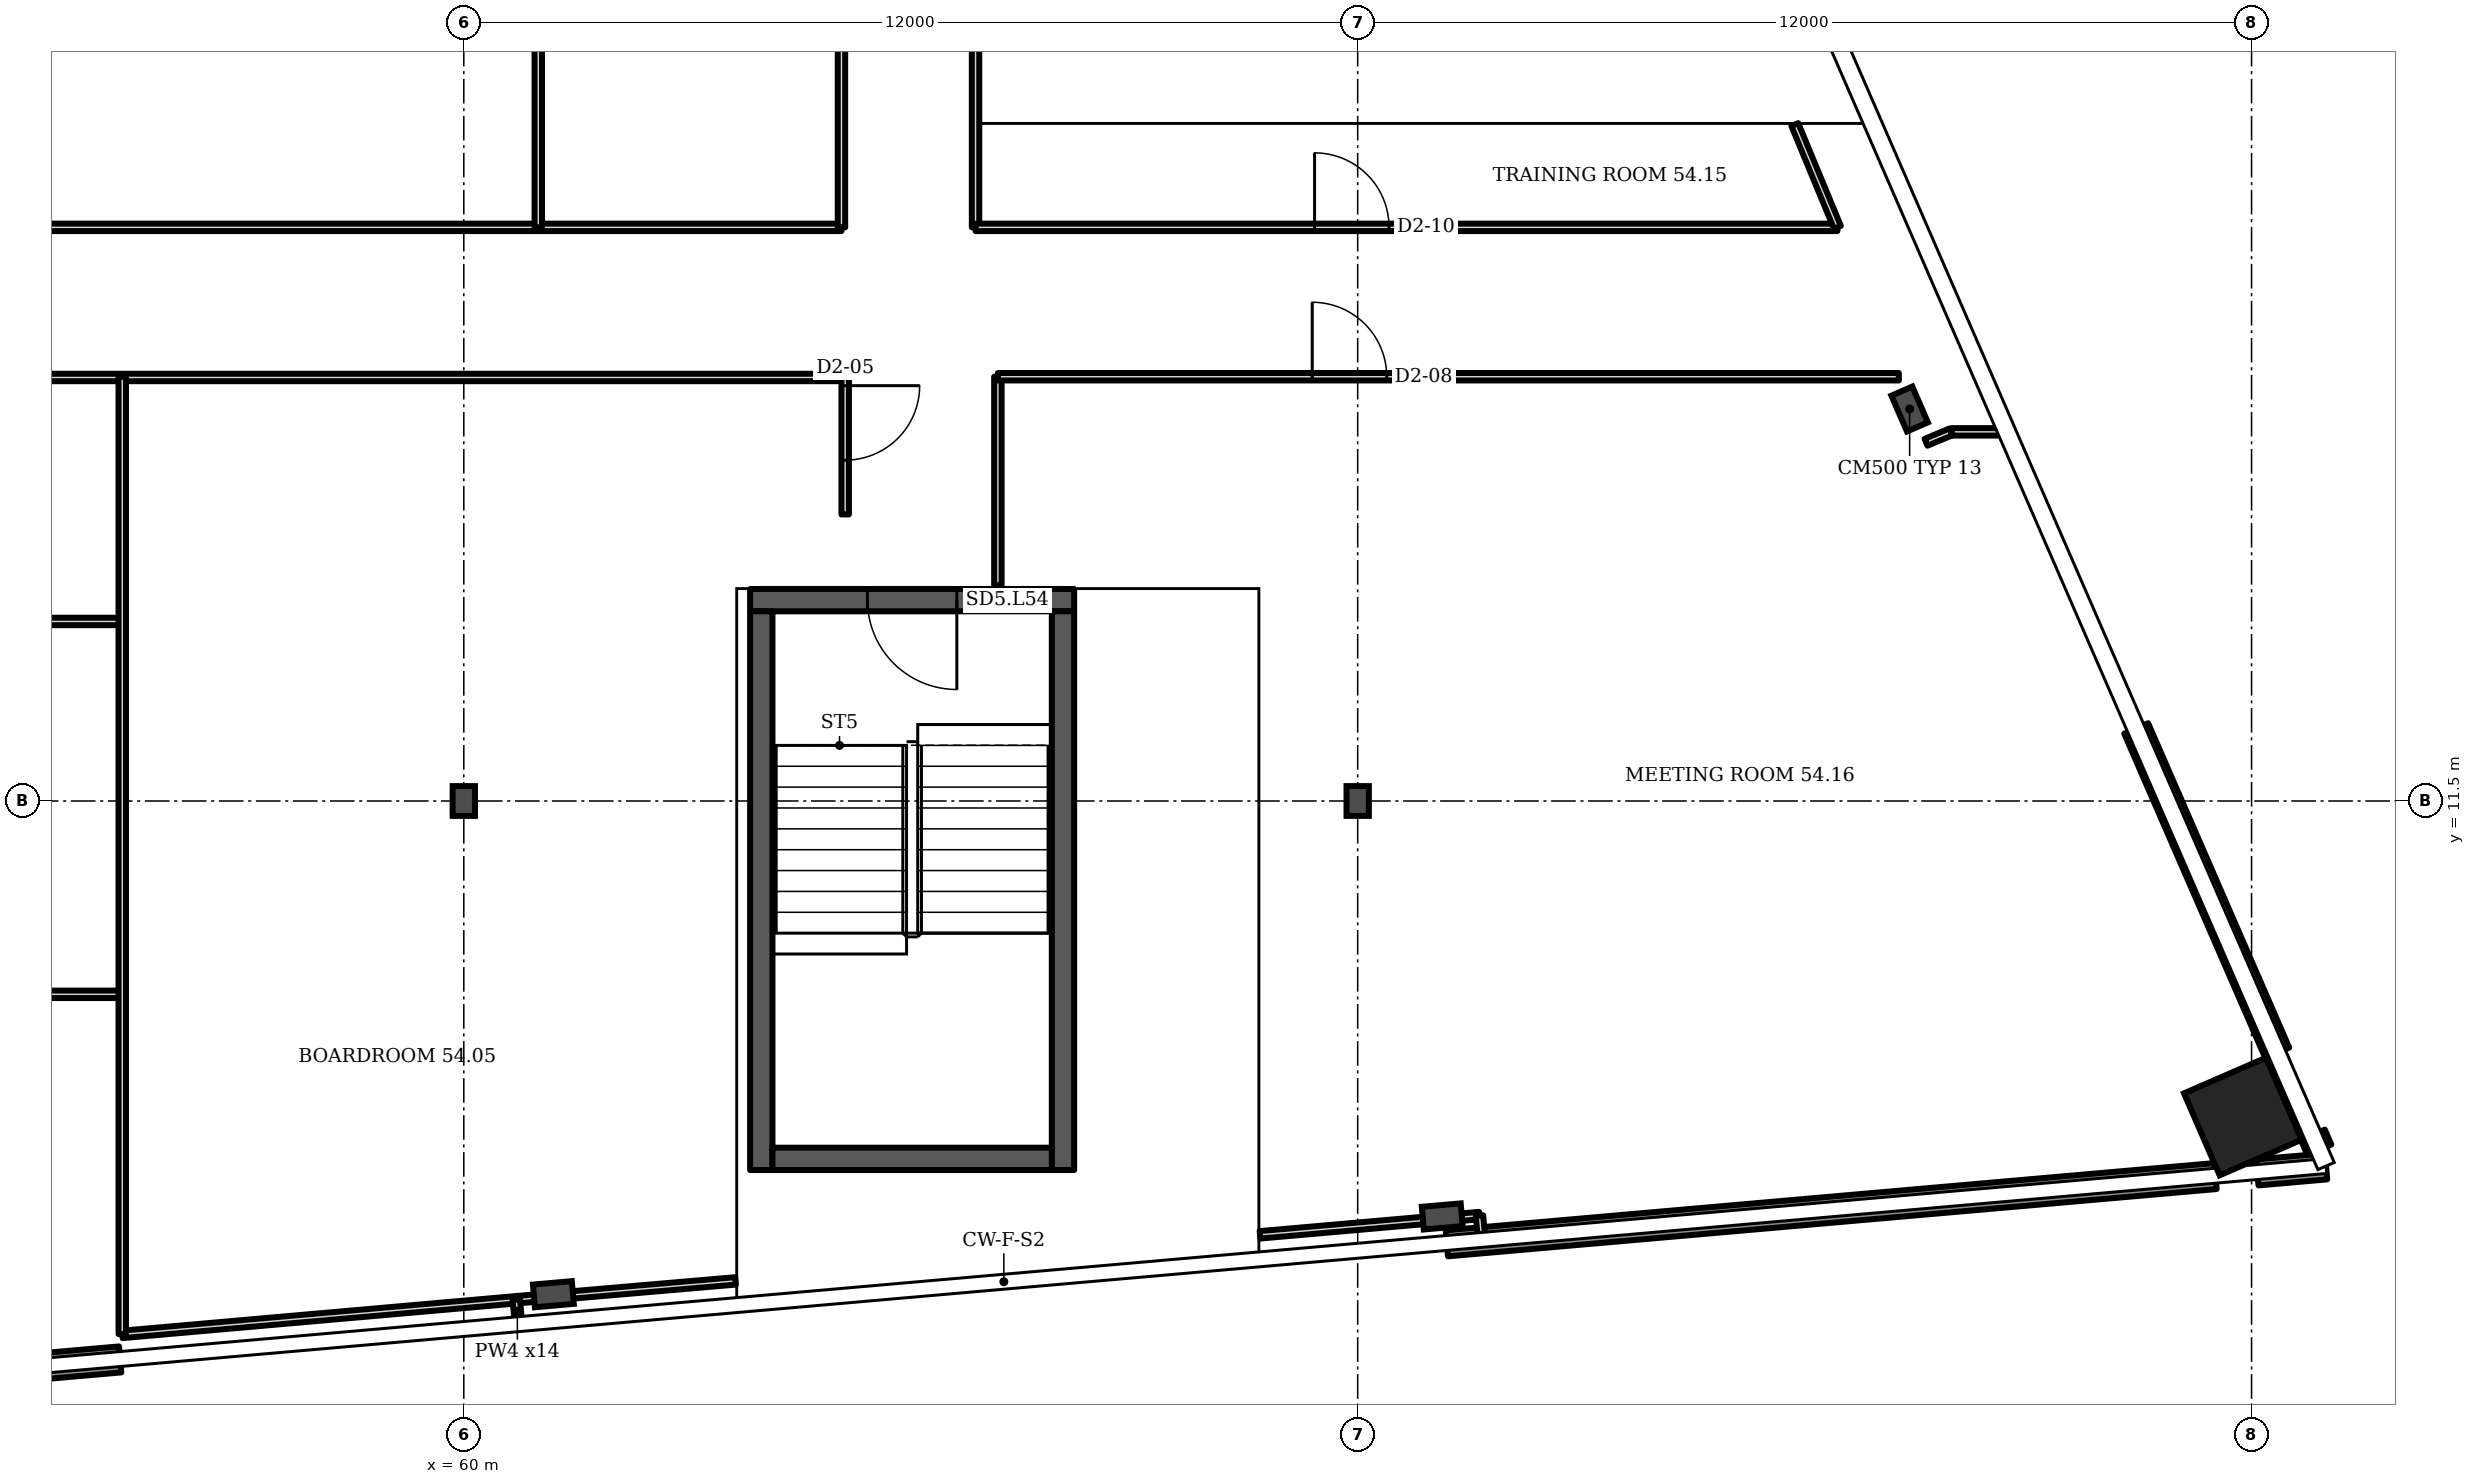
"""IFC4 building model, lengths in metres.
Left out: names, types, materials, properties, quantities, classifications, styles, units other than length and angle.
Written with IfcOpenShell. Run it as: python <this file> out.ifc"""

import sys

from ifc_helpers import new_model, si_unit, direction, frame, frame_2d, origin, origin_2d, place, context, subcontext, project, spatial, rectangle, i_section, extrude, element, fill, save


model = new_model("IFC4")
c1 = context("Model", 3, precision=1e-05, world=origin(), true_north=direction((0.0, 1.0)))
c2 = subcontext(c1, "Body", "Model", "MODEL_VIEW")
j1 = project(units=[si_unit("LENGTHUNIT", "METRE"), si_unit("PLANEANGLEUNIT", "RADIAN")], contexts=[c1])
p1 = place(None, origin())
s1 = spatial("IfcSite", under=j1, at=p1, CompositionType="ELEMENT")
p2 = place(p1, origin())
s2 = spatial("IfcBuilding", under=s1, at=p2, CompositionType="ELEMENT")
p3 = place(p2, frame((0.0, 0.0, 217.9)))
s3 = spatial("IfcBuildingStorey", under=s2, at=p3, CompositionType="ELEMENT", Elevation=217.9)
p4 = place(p3, frame((83.883, 7.265, 0.0), z_axis=(0.0, 0.0, 1.0), x_axis=(-0.398727, 0.917072, 0.0)))
e1 = element("IfcColumn", 1, at=p4, inside=s3, PredefinedType="COLUMN", context=c2, shape_type="SweptSolid", body=[
    extrude(rectangle(XDim=1.2, YDim=1.2, at=origin_2d()), origin(), (0.0, 0.0, 1.0), 3.6),
])
for number, where, z_axis, x_axis in (
    (2, (61.202, 4.879, 0.0), (0.0, 0.0, 1.0), (0.087, -0.996, 0.0)),
    (3, (73.135, 5.923, 0.0), (0.0, 0.0, 1.0), (0.087, -0.996, 0.0)),
    (4, (79.41, 16.762, 0.0), (0.0, 0.0, 1.0), (0.917, 0.399, 0.0)),
):
    element("IfcColumn", number, at=place(p3, frame(where, z_axis=z_axis, x_axis=x_axis)), inside=s3, PredefinedType="COLUMN", context=c2, shape_type="SweptSolid", body=[
        extrude(i_section(OverallWidth=0.306, OverallDepth=0.524, WebThickness=0.021, FlangeThickness=0.04, FilletRadius=0.027, at=origin_2d()), origin(), (0.0, 0.0, 1.0), 3.6),
    ])
for number, where, z_axis, x_axis in (
    (5, (60.0, 11.5, 0.0), (0.0, 0.0, 1.0), (1.0, 0.0, 0.0)),
    (6, (72.0, 11.5, 0.0), (0.0, 0.0, 1.0), (1.0, 0.0, 0.0)),
):
    element("IfcColumn", number, at=place(p3, frame(where, z_axis=z_axis, x_axis=x_axis)), inside=s3, PredefinedType="COLUMN", context=c2, shape_type="SweptSolid", body=[
        extrude(i_section(OverallWidth=0.3, OverallDepth=0.4, WebThickness=0.013, FlangeThickness=0.024, FilletRadius=0.027, at=origin_2d()), origin(), (0.0, 0.0, 1.0), 3.6),
    ])
p5 = place(p3, frame((49.545, 3.493, 0.0), z_axis=(0.0, 0.0, 1.0), x_axis=(0.996196, 0.087138, 0.0)))
e7 = element("IfcWall", 7, at=p5, inside=s3, PredefinedType="SOLIDWALL", context=c2, shape_type="SweptSolid", body=[
    extrude(rectangle(XDim=5.864, YDim=0.35, at=frame_2d((2.932, 0.0))), origin(), (0.0, 0.0, 1.0), 1.0),
])
p6 = place(p3, frame((73.197, 5.562, 0.0), z_axis=(0.0, 0.0, 1.0), x_axis=(0.996198, 0.087163, 0.0)))
e8 = element("IfcWall", 8, at=p6, inside=s3, PredefinedType="SOLIDWALL", context=c2, shape_type="SweptSolid", body=[
    extrude(rectangle(XDim=10.358, YDim=0.35, at=frame_2d((5.179, 0.0))), origin(), (0.0, 0.0, 1.0), 1.0),
])
p7 = place(p3, frame((84.078, 6.514, 0.0), z_axis=(0.0, 0.0, 1.0), x_axis=(0.996213, 0.086971, 0.0)))
e9 = element("IfcWall", 9, at=p7, inside=s3, PredefinedType="SOLIDWALL", context=c2, shape_type="SweptSolid", body=[
    extrude(rectangle(XDim=0.926, YDim=0.35, at=frame_2d((0.463, 0.0))), origin(), (0.0, 0.0, 1.0), 1.0),
])
p8 = place(p3, frame((84.91, 6.819, 0.0), z_axis=(0.0, 0.0, 1.0), x_axis=(-0.398359, 0.91723, 0.0)))
e10 = element("IfcWall", 10, at=p8, inside=s3, PredefinedType="SOLIDWALL", context=c2, shape_type="SweptSolid", body=[
    extrude(rectangle(XDim=0.219, YDim=0.35, at=frame_2d((0.109, 0.0))), origin(), (0.0, 0.0, 1.0), 1.0),
])
p9 = place(p3, frame((84.345, 8.12, 0.0), z_axis=(0.0, 0.0, 1.0), x_axis=(-0.398736, 0.917067, 0.0)))
e11 = element("IfcWall", 11, at=p9, inside=s3, PredefinedType="SOLIDWALL", context=c2, shape_type="SweptSolid", body=[
    extrude(rectangle(XDim=4.748, YDim=0.35, at=frame_2d((2.374, 0.0))), origin(), (0.0, 0.0, 1.0), 1.0),
])
p10 = place(p3, frame((63.844, 14.196, 0.0), z_axis=(0.0, 0.0, 1.0), x_axis=(1.0, 0.0, 0.0)))
e12 = element("IfcWall", 12, at=p10, inside=s3, PredefinedType="SHEAR", context=c2, shape_type="SweptSolid", body=[
    extrude(rectangle(XDim=4.35, YDim=0.3, at=frame_2d((2.175, 0.0))), origin(), (0.0, 0.0, 1.0), 3.2),
])
p11 = place(p10, frame((1.575, 0.0, 0.0)))
e13 = element("IfcOpeningElement", 13, at=p11, cuts=e12, PredefinedType="OPENING", context=c2, shape_type="SweptSolid", body=[
    extrude(rectangle(XDim=1.2, YDim=2.1, at=frame_2d((0.6, 1.05))), frame((0.0, 0.16, 0.0), z_axis=(0.0, -1.0, 0.0), x_axis=(1.0, 0.0, 0.0)), (0.0, 0.0, 1.0), 0.32),
])
p12 = place(p3, frame((47.36, 19.2, 0.0), z_axis=(0.0, 0.0, 1.0), x_axis=(1.0, 0.0, 0.0)))
e14 = element("IfcWall", 14, at=p12, inside=s3, PredefinedType="PARTITIONING", context=c2, shape_type="SweptSolid", body=[
    extrude(rectangle(XDim=17.71, YDim=0.1, at=frame_2d((8.855, 0.0))), origin(), (0.0, 0.0, 1.0), 3.2),
])
p13 = place(p3, frame((47.37, 17.185, 0.0), z_axis=(0.0, 0.0, 1.0), x_axis=(1.0, 0.0, 0.0)))
e15 = element("IfcWall", 15, at=p13, inside=s3, PredefinedType="PARTITIONING", context=c2, shape_type="SweptSolid", body=[
    extrude(rectangle(XDim=17.75, YDim=0.1, at=frame_2d((8.875, 0.0))), origin(), (0.0, 0.0, 1.0), 3.2),
])
for number, where, z_axis, x_axis in (
    (16, (49.16, 8.905, 0.0), (0.0, 0.0, 1.0), (1.0, 0.0, 0.0)),
    (17, (49.16, 13.91, 0.0), (0.0, 0.0, 1.0), (1.0, 0.0, 0.0)),
):
    element("IfcWall", number, at=place(p3, frame(where, z_axis=z_axis, x_axis=x_axis)), inside=s3, PredefinedType="PARTITIONING", context=c2, shape_type="SweptSolid", body=[
        extrude(rectangle(XDim=6.255, YDim=0.1, at=frame_2d((3.127, 0.0))), origin(), (0.0, 0.0, 1.0), 3.2),
    ])
p14 = place(p3, frame((55.415, 4.34, 0.0), z_axis=(0.0, 0.0, 1.0), x_axis=(0.996159, 0.087534, 0.0)))
e18 = element("IfcWall", 18, at=p14, inside=s3, PredefinedType="PARTITIONING", context=c2, shape_type="SweptSolid", body=[
    extrude(rectangle(XDim=5.31, YDim=0.1, at=frame_2d((2.655, 0.0))), origin(), (0.0, 0.0, 1.0), 2.58),
])
p15 = place(p3, frame((55.415, 4.345, 0.0), z_axis=(0.0, 0.0, 1.0), x_axis=(0.0, 1.0, 0.0)))
e19 = element("IfcWall", 19, at=p15, inside=s3, PredefinedType="PARTITIONING", context=c2, shape_type="SweptSolid", body=[
    extrude(rectangle(XDim=12.85, YDim=0.1, at=frame_2d((6.425, 0.0))), origin(), (0.0, 0.0, 1.0), 3.2),
])
p16 = place(p3, frame((60.705, 4.805, 0.0), z_axis=(0.0, 0.0, 1.0), x_axis=(0.996324, 0.085692, 0.0)))
e20 = element("IfcWall", 20, at=p16, inside=s3, PredefinedType="PARTITIONING", context=c2, shape_type="SweptSolid", body=[
    extrude(rectangle(XDim=2.955, YDim=0.1, at=frame_2d((1.477, 0.0))), origin(), (0.0, 0.0, 1.0), 2.58),
])
p17 = place(p3, frame((60.733, 4.497, 0.0), z_axis=(0.0, 0.0, 1.0), x_axis=(-0.090037, 0.995936, 0.0)))
e21 = element("IfcWall", 21, at=p17, inside=s3, PredefinedType="PARTITIONING", context=c2, shape_type="SweptSolid", body=[
    extrude(rectangle(XDim=0.309, YDim=0.1, at=frame_2d((0.155, 0.0))), origin(), (0.0, 0.0, 1.0), 3.2),
])
p18 = place(p3, frame((61.0, 19.2, 0.0), z_axis=(0.0, 0.0, 1.0), x_axis=(0.0, 1.0, 0.0)))
e22 = element("IfcWall", 22, at=p18, inside=s3, PredefinedType="PARTITIONING", context=c2, shape_type="SweptSolid", body=[
    extrude(rectangle(XDim=22.78, YDim=0.1, at=frame_2d((11.39, 0.0))), origin(), (0.0, 0.0, 1.0), 3.2),
])
p19 = place(p3, frame((65.07, 19.2, 0.0), z_axis=(0.0, 0.0, 1.0), x_axis=(0.0, 1.0, 0.0)))
e23 = element("IfcWall", 23, at=p19, inside=s3, PredefinedType="PARTITIONING", context=c2, shape_type="SweptSolid", body=[
    extrude(rectangle(XDim=5.65, YDim=0.1, at=frame_2d((2.825, 0.0))), origin(), (0.0, 0.0, 1.0), 3.2),
])
p20 = place(p19, frame((2.619, 0.0, 0.0)))
e24 = element("IfcOpeningElement", 24, at=p20, cuts=e23, PredefinedType="OPENING", context=c2, shape_type="SweptSolid", body=[
    extrude(rectangle(XDim=1.0, YDim=2.1, at=frame_2d((0.5, 1.05))), frame((0.0, 0.06, 0.0), z_axis=(0.0, -1.0, 0.0), x_axis=(1.0, 0.0, 0.0)), (0.0, 0.0, 1.0), 0.12),
])
p21 = place(p3, frame((65.12, 15.346, 0.0), z_axis=(0.0, 0.0, 1.0), x_axis=(0.0, 1.0, 0.0)))
e25 = element("IfcWall", 25, at=p21, inside=s3, PredefinedType="PARTITIONING", context=c2, shape_type="SweptSolid", body=[
    extrude(rectangle(XDim=1.849, YDim=0.1, at=frame_2d((0.924, 0.0))), origin(), (0.0, 0.0, 1.0), 3.2),
])
p22 = place(p21, frame((0.729, 0.0, 0.0)))
e26 = element("IfcOpeningElement", 26, at=p22, cuts=e25, PredefinedType="OPENING", context=c2, shape_type="SweptSolid", body=[
    extrude(rectangle(XDim=1.0, YDim=2.1, at=frame_2d((0.5, 1.05))), frame((0.0, 0.06, 0.0), z_axis=(0.0, -1.0, 0.0), x_axis=(1.0, 0.0, 0.0)), (0.0, 0.0, 1.0), 0.12),
])
p23 = place(p3, frame((66.87, 19.2, 0.0), z_axis=(0.0, 0.0, 1.0), x_axis=(0.0, 1.0, 0.0)))
e27 = element("IfcWall", 27, at=p23, inside=s3, PredefinedType="PARTITIONING", context=c2, shape_type="SweptSolid", body=[
    extrude(rectangle(XDim=2.575, YDim=0.1, at=frame_2d((1.288, 0.0))), origin(), (0.0, 0.0, 1.0), 3.2),
])
p24 = place(p3, frame((66.87, 19.2, 0.0), z_axis=(0.0, 0.0, 1.0), x_axis=(1.0, 0.0, 0.0)))
e28 = element("IfcWall", 28, at=p24, inside=s3, PredefinedType="PARTITIONING", context=c2, shape_type="SweptSolid", body=[
    extrude(rectangle(XDim=11.57, YDim=0.1, at=frame_2d((5.785, 0.0))), origin(), (0.0, 0.0, 1.0), 3.2),
])
p25 = place(p24, frame((4.551, 0.0, 0.0)))
e29 = element("IfcOpeningElement", 29, at=p25, cuts=e28, PredefinedType="OPENING", context=c2, shape_type="SweptSolid", body=[
    extrude(rectangle(XDim=1.0, YDim=2.1, at=frame_2d((0.5, 1.05))), frame((0.0, 0.06, 0.0), z_axis=(0.0, -1.0, 0.0), x_axis=(1.0, 0.0, 0.0)), (0.0, 0.0, 1.0), 0.12),
])
p26 = place(p3, frame((67.17, 14.395, 0.0), z_axis=(0.0, 0.0, 1.0), x_axis=(0.0, 1.0, 0.0)))
e30 = element("IfcWall", 30, at=p26, inside=s3, PredefinedType="PARTITIONING", context=c2, shape_type="SweptSolid", body=[
    extrude(rectangle(XDim=2.8, YDim=0.1, at=frame_2d((1.4, 0.0))), origin(), (0.0, 0.0, 1.0), 3.2),
])
p27 = place(p3, frame((67.17, 17.195, 0.0), z_axis=(0.0, 0.0, 1.0), x_axis=(1.0, 0.0, 0.0)))
e31 = element("IfcWall", 31, at=p27, inside=s3, PredefinedType="PARTITIONING", context=c2, shape_type="SweptSolid", body=[
    extrude(rectangle(XDim=12.095, YDim=0.1, at=frame_2d((6.047, 0.0))), origin(), (0.0, 0.0, 1.0), 3.2),
])
p28 = place(p27, frame((4.22, 0.0, 0.0)))
e32 = element("IfcOpeningElement", 32, at=p28, cuts=e31, PredefinedType="OPENING", context=c2, shape_type="SweptSolid", body=[
    extrude(rectangle(XDim=1.0, YDim=2.1, at=frame_2d((0.5, 1.05))), frame((0.0, 0.06, 0.0), z_axis=(0.0, -1.0, 0.0), x_axis=(1.0, 0.0, 0.0)), (0.0, 0.0, 1.0), 0.12),
])
p29 = place(p3, frame((70.689, 5.677, 0.0), z_axis=(0.0, 0.0, 1.0), x_axis=(0.996174, 0.087417, 0.0)))
e33 = element("IfcWall", 33, at=p29, inside=s3, PredefinedType="PARTITIONING", context=c2, shape_type="SweptSolid", body=[
    extrude(rectangle(XDim=2.958, YDim=0.1, at=frame_2d((1.479, 0.0))), origin(), (0.0, 0.0, 1.0), 2.58),
])
p30 = place(p3, frame((73.663, 5.628, 0.0), z_axis=(0.0, 0.0, 1.0), x_axis=(-0.091893, 0.995772, 0.0)))
e34 = element("IfcWall", 34, at=p30, inside=s3, PredefinedType="PARTITIONING", context=c2, shape_type="SweptSolid", body=[
    extrude(rectangle(XDim=0.308, YDim=0.1, at=frame_2d((0.154, 0.0))), origin(), (0.0, 0.0, 1.0), 3.2),
])
p31 = place(p3, frame((78.44, 19.2, 0.0), z_axis=(0.0, 0.0, 1.0), x_axis=(-0.382605, 0.923907, 0.0)))
e35 = element("IfcWall", 35, at=p31, inside=s3, PredefinedType="PARTITIONING", context=c2, shape_type="SweptSolid", body=[
    extrude(rectangle(XDim=1.494, YDim=0.1, at=frame_2d((0.747, 0.0))), origin(), (0.0, 0.0, 1.0), 3.2),
])
p32 = place(p3, frame((79.63, 16.315, 0.0), z_axis=(0.0, 0.0, 1.0), x_axis=(0.92262, 0.385713, 0.0)))
e36 = element("IfcWall", 36, at=p32, inside=s3, PredefinedType="PARTITIONING", context=c2, shape_type="SweptSolid", body=[
    extrude(rectangle(XDim=0.363, YDim=0.1, at=frame_2d((0.182, 0.0))), origin(), (0.0, 0.0, 1.0), 3.2),
])
p33 = place(p3, frame((79.975, 16.455, 0.0), z_axis=(0.0, 0.0, 1.0), x_axis=(1.0, 0.0, 0.0)))
e37 = element("IfcWall", 37, at=p33, inside=s3, PredefinedType="PARTITIONING", context=c2, shape_type="SweptSolid", body=[
    extrude(rectangle(XDim=0.718, YDim=0.1, at=frame_2d((0.359, 0.0))), origin(), (0.0, 0.0, 1.0), 3.2),
])
for number, where, z_axis, x_axis in (
    (38, (63.994, 6.546, 0.0), (0.0, 0.0, 1.0), (0.0, 1.0, 0.0)),
    (39, (68.044, 6.546, 0.0), (0.0, 0.0, 1.0), (0.0, 1.0, 0.0)),
):
    element("IfcWall", number, at=place(p3, frame(where, z_axis=z_axis, x_axis=x_axis)), inside=s3, PredefinedType="SHEAR", context=c2, shape_type="SweptSolid", body=[
        extrude(rectangle(XDim=7.5, YDim=0.3, at=frame_2d((3.75, 0.0))), origin(), (0.0, 0.0, 1.0), 3.2),
    ])
p34 = place(p3, frame((64.144, 6.696, 0.0), z_axis=(0.0, 0.0, 1.0), x_axis=(1.0, 0.0, 0.0)))
e40 = element("IfcWall", 40, at=p34, inside=s3, PredefinedType="SHEAR", context=c2, shape_type="SweptSolid", body=[
    extrude(rectangle(XDim=3.75, YDim=0.3, at=frame_2d((1.875, 0.0))), origin(), (0.0, 0.0, 1.0), 3.2),
])
p35 = place(p11, origin())
e41 = element("IfcDoor", 41, at=p35, inside=s3, OperationType="SINGLE_SWING_RIGHT", PredefinedType="DOOR", context=c2, shape_type="SweptSolid", body=[
    extrude(rectangle(XDim=1.2, YDim=2.1, at=frame_2d((0.6, 1.05))), frame((0.0, 0.025, 0.0), z_axis=(0.0, -1.0, 0.0), x_axis=(1.0, 0.0, 0.0)), (0.0, 0.0, 1.0), 0.05),
])
fill(e13, e41)
p36 = place(p22, origin())
e42 = element("IfcDoor", 42, at=p36, inside=s3, OperationType="SINGLE_SWING_RIGHT", PredefinedType="DOOR", context=c2, shape_type="SweptSolid", body=[
    extrude(rectangle(XDim=1.0, YDim=2.1, at=frame_2d((0.5, 1.05))), frame((0.0, 0.025, 0.0), z_axis=(0.0, -1.0, 0.0), x_axis=(1.0, 0.0, 0.0)), (0.0, 0.0, 1.0), 0.05),
])
fill(e26, e42)
p37 = place(p28, origin())
e43 = element("IfcDoor", 43, at=p37, inside=s3, OperationType="SINGLE_SWING_LEFT", PredefinedType="DOOR", context=c2, shape_type="SweptSolid", body=[
    extrude(rectangle(XDim=1.0, YDim=2.1, at=frame_2d((0.5, 1.05))), frame((0.0, 0.025, 0.0), z_axis=(0.0, -1.0, 0.0), x_axis=(1.0, 0.0, 0.0)), (0.0, 0.0, 1.0), 0.05),
])
fill(e32, e43)
p38 = place(p25, origin())
e44 = element("IfcDoor", 44, at=p38, inside=s3, OperationType="SINGLE_SWING_LEFT", PredefinedType="DOOR", context=c2, shape_type="SweptSolid", body=[
    extrude(rectangle(XDim=1.0, YDim=2.1, at=frame_2d((0.5, 1.05))), frame((0.0, 0.025, 0.0), z_axis=(0.0, -1.0, 0.0), x_axis=(1.0, 0.0, 0.0)), (0.0, 0.0, 1.0), 0.05),
])
fill(e29, e44)
save(model, sys.argv[1])
